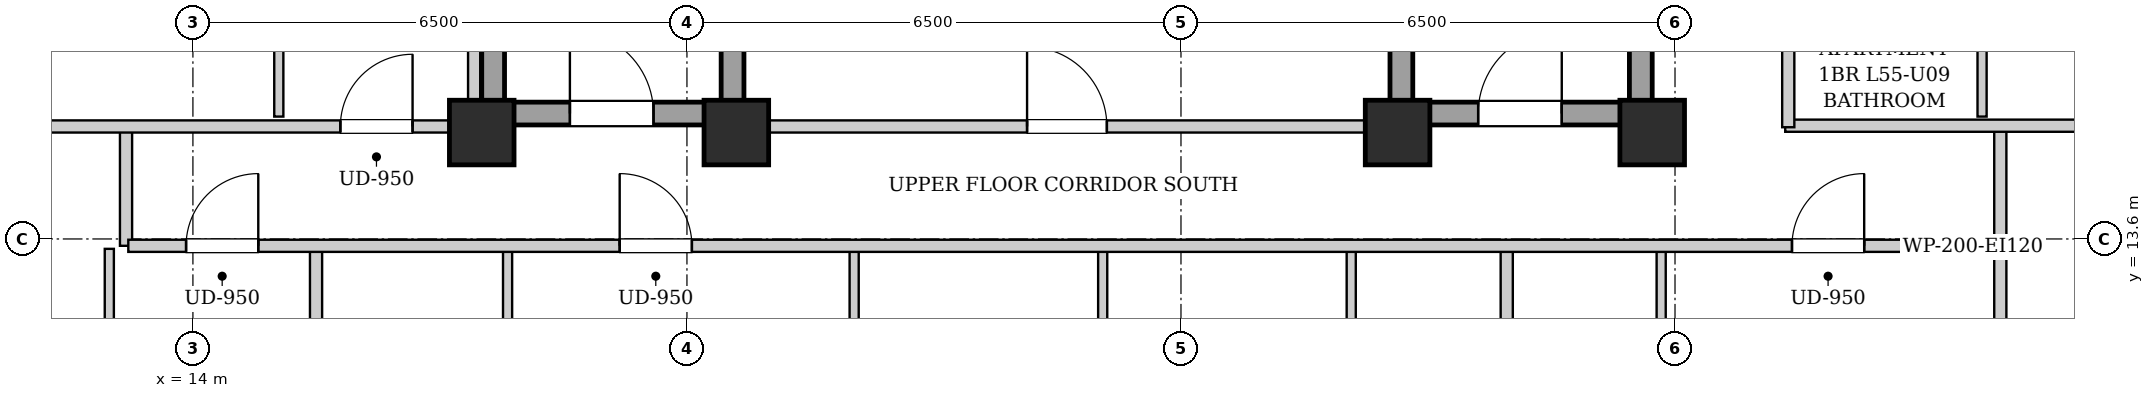
"""IFC4 building model, lengths in metres.
Left out: names, types, materials, properties, quantities, classifications, styles, units other than length and angle.
Written with IfcOpenShell. Run it as: python <this file> out.ifc"""

import sys

from ifc_helpers import new_model, si_unit, direction, frame, frame_2d, origin, origin_2d, place, context, subcontext, project, spatial, rectangle, extrude, element, fill, save


model = new_model("IFC4")
c1 = context("Model", 3, precision=1e-05, world=origin(), true_north=direction((0.0, 1.0)))
c2 = subcontext(c1, "Body", "Model", "MODEL_VIEW")
j1 = project(units=[si_unit("LENGTHUNIT", "METRE"), si_unit("PLANEANGLEUNIT", "RADIAN")], contexts=[c1])
p1 = place(None, origin())
s1 = spatial("IfcSite", under=j1, at=p1, CompositionType="ELEMENT")
p2 = place(p1, origin())
s2 = spatial("IfcBuilding", under=s1, at=p2, CompositionType="ELEMENT")
p3 = place(p2, frame((0.0, 0.0, 190.9)))
s3 = spatial("IfcBuildingStorey", under=s2, at=p3, CompositionType="ELEMENT", Elevation=190.9)
for number, where, z_axis, x_axis in (
    (1, (17.8, 15.0, 0.0), (0.0, 0.0, 1.0), (1.0, 0.0, 0.0)),
    (2, (21.15, 15.0, 0.0), (0.0, 0.0, 1.0), (1.0, 0.0, 0.0)),
    (3, (29.85, 15.0, 0.0), (0.0, 0.0, 1.0), (1.0, 0.0, 0.0)),
    (4, (33.2, 15.0, 0.0), (0.0, 0.0, 1.0), (1.0, 0.0, 0.0)),
):
    element("IfcColumn", number, at=place(p3, frame(where, z_axis=z_axis, x_axis=x_axis)), inside=s3, PredefinedType="COLUMN", context=c2, shape_type="SweptSolid", body=[
        extrude(rectangle(XDim=0.85, YDim=0.85, at=origin_2d()), origin(), (0.0, 0.0, 1.0), 3.3),
    ])
for number, where, z_axis, x_axis in (
    (5, (17.95, 15.1, 0.0), (0.0, 0.0, 1.0), (0.0, 1.0, 0.0)),
    (6, (21.1, 15.1, 0.0), (0.0, 0.0, 1.0), (0.0, 1.0, 0.0)),
):
    element("IfcWall", number, at=place(p3, frame(where, z_axis=z_axis, x_axis=x_axis)), inside=s3, PredefinedType="SHEAR", context=c2, shape_type="SweptSolid", body=[
        extrude(rectangle(XDim=9.0, YDim=0.3, at=frame_2d((4.5, 0.0))), origin(), (0.0, 0.0, 1.0), 3.04),
    ])
p4 = place(p3, frame((18.1, 15.25, 0.0), z_axis=(0.0, 0.0, 1.0), x_axis=(1.0, 0.0, 0.0)))
e7 = element("IfcWall", 7, at=p4, inside=s3, PredefinedType="SHEAR", context=c2, shape_type="SweptSolid", body=[
    extrude(rectangle(XDim=2.85, YDim=0.3, at=frame_2d((1.425, 0.0))), origin(), (0.0, 0.0, 1.0), 3.04),
])
p5 = place(p4, frame((0.86, 0.0, 0.0)))
e8 = element("IfcOpeningElement", 8, at=p5, cuts=e7, PredefinedType="OPENING", context=c2, shape_type="SweptSolid", body=[
    extrude(rectangle(XDim=1.1, YDim=2.05, at=frame_2d((0.55, 1.025))), frame((0.0, 0.16, 0.0), z_axis=(0.0, -1.0, 0.0), x_axis=(1.0, 0.0, 0.0)), (0.0, 0.0, 1.0), 0.32),
])
for number, where, z_axis, x_axis in (
    (9, (29.9, 15.1, 0.0), (0.0, 0.0, 1.0), (0.0, 1.0, 0.0)),
    (10, (33.05, 15.1, 0.0), (0.0, 0.0, 1.0), (0.0, 1.0, 0.0)),
):
    element("IfcWall", number, at=place(p3, frame(where, z_axis=z_axis, x_axis=x_axis)), inside=s3, PredefinedType="SHEAR", context=c2, shape_type="SweptSolid", body=[
        extrude(rectangle(XDim=9.0, YDim=0.3, at=frame_2d((4.5, 0.0))), origin(), (0.0, 0.0, 1.0), 3.04),
    ])
p6 = place(p3, frame((30.05, 15.25, 0.0), z_axis=(0.0, 0.0, 1.0), x_axis=(1.0, 0.0, 0.0)))
e11 = element("IfcWall", 11, at=p6, inside=s3, PredefinedType="SHEAR", context=c2, shape_type="SweptSolid", body=[
    extrude(rectangle(XDim=2.85, YDim=0.3, at=frame_2d((1.425, 0.0))), origin(), (0.0, 0.0, 1.0), 3.04),
])
p7 = place(p6, frame((0.86, 0.0, 0.0)))
e12 = element("IfcOpeningElement", 12, at=p7, cuts=e11, PredefinedType="OPENING", context=c2, shape_type="SweptSolid", body=[
    extrude(rectangle(XDim=1.1, YDim=2.05, at=frame_2d((0.55, 1.025))), frame((0.0, 0.16, 0.0), z_axis=(0.0, -1.0, 0.0), x_axis=(1.0, 0.0, 0.0)), (0.0, 0.0, 1.0), 0.32),
])
p8 = place(p3, frame((21.25, 15.08, 0.0), z_axis=(0.0, 0.0, 1.0), x_axis=(1.0, 0.0, 0.0)))
e13 = element("IfcWall", 13, at=p8, inside=s3, PredefinedType="PARTITIONING", context=c2, shape_type="SweptSolid", body=[
    extrude(rectangle(XDim=8.5, YDim=0.16, at=frame_2d((4.25, 0.0))), origin(), (0.0, 0.0, 1.0), 2.556),
])
p9 = place(p8, frame((3.725, 0.0, 0.0)))
e14 = element("IfcOpeningElement", 14, at=p9, cuts=e13, PredefinedType="OPENING", context=c2, shape_type="SweptSolid", body=[
    extrude(rectangle(XDim=1.05, YDim=2.05, at=frame_2d((0.525, 1.025))), frame((0.0, 0.09, 0.0), z_axis=(0.0, -1.0, 0.0), x_axis=(1.0, 0.0, 0.0)), (0.0, 0.0, 1.0), 0.18),
])
for number, where, z_axis, x_axis in (
    (15, (13.12, 13.51, 0.0), (0.0, 0.0, 1.0), (0.0, 1.0, 0.0)),
    (16, (37.78, 13.51, 0.0), (0.0, 0.0, 1.0), (0.0, 1.0, 0.0)),
):
    element("IfcWall", number, at=place(p3, frame(where, z_axis=z_axis, x_axis=x_axis)), inside=s3, PredefinedType="PARTITIONING", context=c2, shape_type="SweptSolid", body=[
        extrude(rectangle(XDim=1.58, YDim=0.16, at=frame_2d((0.79, 0.0))), origin(), (0.0, 0.0, 1.0), 3.04),
    ])
p10 = place(p3, frame((34.95, 15.09, 0.0), z_axis=(0.0, 0.0, 1.0), x_axis=(1.0, 0.0, 0.0)))
e17 = element("IfcWall", 17, at=p10, inside=s3, PredefinedType="PARTITIONING", context=c2, shape_type="SweptSolid", body=[
    extrude(rectangle(XDim=5.07, YDim=0.16, at=frame_2d((2.535, 0.0))), origin(), (0.0, 0.0, 1.0), 2.556),
])
p11 = place(p3, frame((12.9, 10.62, 0.0), z_axis=(0.0, 0.0, 1.0), x_axis=(0.0, 1.0, 0.0)))
e18 = element("IfcWall", 18, at=p11, inside=s3, PredefinedType="PARTITIONING", context=c2, shape_type="SweptSolid", body=[
    extrude(rectangle(XDim=2.85, YDim=0.12, at=frame_2d((1.425, 0.0))), origin(), (0.0, 0.0, 1.0), 3.04),
])
p12 = place(p11, frame((0.995, 0.0, 0.0)))
e19 = element("IfcOpeningElement", 19, at=p12, cuts=e18, PredefinedType="OPENING", context=c2, shape_type="SweptSolid", body=[
    extrude(rectangle(XDim=0.86, YDim=2.05, at=frame_2d((0.43, 1.025))), frame((0.0, 0.07, 0.0), z_axis=(0.0, -1.0, 0.0), x_axis=(1.0, 0.0, 0.0)), (0.0, 0.0, 1.0), 0.14),
])
p13 = place(p3, frame((15.62, 4.08, 0.0), z_axis=(0.0, 0.0, 1.0), x_axis=(0.0, 1.0, 0.0)))
e20 = element("IfcWall", 20, at=p13, inside=s3, PredefinedType="PARTITIONING", context=c2, shape_type="SweptSolid", body=[
    extrude(rectangle(XDim=9.39, YDim=0.16, at=frame_2d((4.695, 0.0))), origin(), (0.0, 0.0, 1.0), 3.04),
])
p14 = place(p3, frame((18.14, 10.62, 0.0), z_axis=(0.0, 0.0, 1.0), x_axis=(0.0, 1.0, 0.0)))
e21 = element("IfcWall", 21, at=p14, inside=s3, PredefinedType="PARTITIONING", context=c2, shape_type="SweptSolid", body=[
    extrude(rectangle(XDim=2.85, YDim=0.12, at=frame_2d((1.425, 0.0))), origin(), (0.0, 0.0, 1.0), 3.04),
])
p15 = place(p14, frame((0.995, 0.0, 0.0)))
e22 = element("IfcOpeningElement", 22, at=p15, cuts=e21, PredefinedType="OPENING", context=c2, shape_type="SweptSolid", body=[
    extrude(rectangle(XDim=0.86, YDim=2.05, at=frame_2d((0.43, 1.025))), frame((0.0, 0.07, 0.0), z_axis=(0.0, -1.0, 0.0), x_axis=(1.0, 0.0, 0.0)), (0.0, 0.0, 1.0), 0.14),
])
p16 = place(p3, frame((22.7, 10.62, 0.0), z_axis=(0.0, 0.0, 1.0), x_axis=(0.0, 1.0, 0.0)))
e23 = element("IfcWall", 23, at=p16, inside=s3, PredefinedType="PARTITIONING", context=c2, shape_type="SweptSolid", body=[
    extrude(rectangle(XDim=2.85, YDim=0.12, at=frame_2d((1.425, 0.0))), origin(), (0.0, 0.0, 1.0), 3.04),
])
p17 = place(p16, frame((0.975, 0.0, 0.0)))
e24 = element("IfcOpeningElement", 24, at=p17, cuts=e23, PredefinedType="OPENING", context=c2, shape_type="SweptSolid", body=[
    extrude(rectangle(XDim=0.9, YDim=2.05, at=frame_2d((0.45, 1.025))), frame((0.0, 0.07, 0.0), z_axis=(0.0, -1.0, 0.0), x_axis=(1.0, 0.0, 0.0)), (0.0, 0.0, 1.0), 0.14),
])
p18 = place(p3, frame((25.97, 10.62, 0.0), z_axis=(0.0, 0.0, 1.0), x_axis=(0.0, 1.0, 0.0)))
e25 = element("IfcWall", 25, at=p18, inside=s3, PredefinedType="PARTITIONING", context=c2, shape_type="SweptSolid", body=[
    extrude(rectangle(XDim=2.85, YDim=0.12, at=frame_2d((1.425, 0.0))), origin(), (0.0, 0.0, 1.0), 3.04),
])
p19 = place(p18, frame((0.975, 0.0, 0.0)))
e26 = element("IfcOpeningElement", 26, at=p19, cuts=e25, PredefinedType="OPENING", context=c2, shape_type="SweptSolid", body=[
    extrude(rectangle(XDim=0.9, YDim=2.05, at=frame_2d((0.45, 1.025))), frame((0.0, 0.07, 0.0), z_axis=(0.0, -1.0, 0.0), x_axis=(1.0, 0.0, 0.0)), (0.0, 0.0, 1.0), 0.14),
])
p20 = place(p3, frame((29.24, 10.62, 0.0), z_axis=(0.0, 0.0, 1.0), x_axis=(0.0, 1.0, 0.0)))
e27 = element("IfcWall", 27, at=p20, inside=s3, PredefinedType="PARTITIONING", context=c2, shape_type="SweptSolid", body=[
    extrude(rectangle(XDim=2.85, YDim=0.12, at=frame_2d((1.425, 0.0))), origin(), (0.0, 0.0, 1.0), 3.04),
])
p21 = place(p20, frame((0.975, 0.0, 0.0)))
e28 = element("IfcOpeningElement", 28, at=p21, cuts=e27, PredefinedType="OPENING", context=c2, shape_type="SweptSolid", body=[
    extrude(rectangle(XDim=0.9, YDim=2.05, at=frame_2d((0.45, 1.025))), frame((0.0, 0.07, 0.0), z_axis=(0.0, -1.0, 0.0), x_axis=(1.0, 0.0, 0.0)), (0.0, 0.0, 1.0), 0.14),
])
p22 = place(p3, frame((37.78, 10.56, 0.0), z_axis=(0.0, 0.0, 1.0), x_axis=(0.0, 1.0, 0.0)))
e29 = element("IfcWall", 29, at=p22, inside=s3, PredefinedType="PARTITIONING", context=c2, shape_type="SweptSolid", body=[
    extrude(rectangle(XDim=2.91, YDim=0.16, at=frame_2d((1.455, 0.0))), origin(), (0.0, 0.0, 1.0), 3.04),
])
p23 = place(p3, frame((31.286, 4.08, 0.0), z_axis=(0.0, 0.0, 1.0), x_axis=(0.0, 1.0, 0.0)))
e30 = element("IfcWall", 30, at=p23, inside=s3, PredefinedType="PARTITIONING", context=c2, shape_type="SweptSolid", body=[
    extrude(rectangle(XDim=9.39, YDim=0.16, at=frame_2d((4.695, 0.0))), origin(), (0.0, 0.0, 1.0), 3.04),
])
p24 = place(p3, frame((33.318, 10.62, 0.0), z_axis=(0.0, 0.0, 1.0), x_axis=(0.0, 1.0, 0.0)))
e31 = element("IfcWall", 31, at=p24, inside=s3, PredefinedType="PARTITIONING", context=c2, shape_type="SweptSolid", body=[
    extrude(rectangle(XDim=2.85, YDim=0.12, at=frame_2d((1.425, 0.0))), origin(), (0.0, 0.0, 1.0), 3.04),
])
p25 = place(p24, frame((0.995, 0.0, 0.0)))
e32 = element("IfcOpeningElement", 32, at=p25, cuts=e31, PredefinedType="OPENING", context=c2, shape_type="SweptSolid", body=[
    extrude(rectangle(XDim=0.86, YDim=2.05, at=frame_2d((0.43, 1.025))), frame((0.0, 0.07, 0.0), z_axis=(0.0, -1.0, 0.0), x_axis=(1.0, 0.0, 0.0)), (0.0, 0.0, 1.0), 0.14),
])
p26 = place(p3, frame((10.88, 15.08, 0.0), z_axis=(0.0, 0.0, 1.0), x_axis=(1.0, 0.0, 0.0)))
e33 = element("IfcWall", 33, at=p26, inside=s3, PredefinedType="PARTITIONING", context=c2, shape_type="SweptSolid", body=[
    extrude(rectangle(XDim=6.88, YDim=0.16, at=frame_2d((3.44, 0.0))), origin(), (0.0, 0.0, 1.0), 2.556),
])
p27 = place(p26, frame((5.06, 0.0, 0.0)))
e34 = element("IfcOpeningElement", 34, at=p27, cuts=e33, PredefinedType="OPENING", context=c2, shape_type="SweptSolid", body=[
    extrude(rectangle(XDim=0.95, YDim=2.1, at=frame_2d((0.475, 1.05))), frame((0.0, 0.09, 0.0), z_axis=(0.0, -1.0, 0.0), x_axis=(1.0, 0.0, 0.0)), (0.0, 0.0, 1.0), 0.18),
])
p28 = place(p3, frame((15.13, 15.21, 0.0), z_axis=(0.0, 0.0, 1.0), x_axis=(0.0, 1.0, 0.0)))
e35 = element("IfcWall", 35, at=p28, inside=s3, PredefinedType="PARTITIONING", context=c2, shape_type="SweptSolid", body=[
    extrude(rectangle(XDim=4.5, YDim=0.12, at=frame_2d((2.25, 0.0))), origin(), (0.0, 0.0, 1.0), 3.04),
])
p29 = place(p28, frame((1.8, 0.0, 0.0)))
e36 = element("IfcOpeningElement", 36, at=p29, cuts=e35, PredefinedType="OPENING", context=c2, shape_type="SweptSolid", body=[
    extrude(rectangle(XDim=0.9, YDim=2.05, at=frame_2d((0.45, 1.025))), frame((0.0, 0.07, 0.0), z_axis=(0.0, -1.0, 0.0), x_axis=(1.0, 0.0, 0.0)), (0.0, 0.0, 1.0), 0.14),
])
p30 = place(p3, frame((37.54, 15.21, 0.0), z_axis=(0.0, 0.0, 1.0), x_axis=(0.0, 1.0, 0.0)))
e37 = element("IfcWall", 37, at=p30, inside=s3, PredefinedType="PARTITIONING", context=c2, shape_type="SweptSolid", body=[
    extrude(rectangle(XDim=2.159, YDim=0.12, at=frame_2d((1.08, 0.0))), origin(), (0.0, 0.0, 1.0), 3.04),
])
p31 = place(p3, frame((13.15, 13.51, 0.0), z_axis=(0.0, 0.0, 1.0), x_axis=(1.0, 0.0, 0.0)))
e38 = element("IfcWall", 38, at=p31, inside=s3, PredefinedType="PARTITIONING", context=c2, shape_type="SweptSolid", body=[
    extrude(rectangle(XDim=24.6, YDim=0.16, at=frame_2d((12.3, 0.0))), origin(), (0.0, 0.0, 1.0), 3.04),
])
p32 = place(p31, frame((0.76, 0.0, 0.0)))
e39 = element("IfcOpeningElement", 39, at=p32, cuts=e38, PredefinedType="OPENING", context=c2, shape_type="SweptSolid", body=[
    extrude(rectangle(XDim=0.95, YDim=2.1, at=frame_2d((0.475, 1.05))), frame((0.0, 0.09, 0.0), z_axis=(0.0, -1.0, 0.0), x_axis=(1.0, 0.0, 0.0)), (0.0, 0.0, 1.0), 0.18),
])
p33 = place(p31, frame((6.465, 0.0, 0.0)))
e40 = element("IfcOpeningElement", 40, at=p33, cuts=e38, PredefinedType="OPENING", context=c2, shape_type="SweptSolid", body=[
    extrude(rectangle(XDim=0.95, YDim=2.1, at=frame_2d((0.475, 1.05))), frame((0.0, 0.09, 0.0), z_axis=(0.0, -1.0, 0.0), x_axis=(1.0, 0.0, 0.0)), (0.0, 0.0, 1.0), 0.18),
])
p34 = place(p31, frame((21.889, 0.0, 0.0)))
e41 = element("IfcOpeningElement", 41, at=p34, cuts=e38, PredefinedType="OPENING", context=c2, shape_type="SweptSolid", body=[
    extrude(rectangle(XDim=0.95, YDim=2.1, at=frame_2d((0.475, 1.05))), frame((0.0, 0.09, 0.0), z_axis=(0.0, -1.0, 0.0), x_axis=(1.0, 0.0, 0.0)), (0.0, 0.0, 1.0), 0.18),
])
p35 = place(p3, frame((17.7, 15.02, 0.0), z_axis=(0.0, 0.0, 1.0), x_axis=(0.0, 1.0, 0.0)))
e42 = element("IfcWall", 42, at=p35, inside=s3, PredefinedType="PARTITIONING", context=c2, shape_type="SweptSolid", body=[
    extrude(rectangle(XDim=13.98, YDim=0.16, at=frame_2d((6.99, 0.0))), origin(), (0.0, 0.0, 1.0), 3.04),
])
p36 = place(p3, frame((34.99, 15.07, 0.0), z_axis=(0.0, 0.0, 1.0), x_axis=(0.0, 1.0, 0.0)))
e43 = element("IfcWall", 43, at=p36, inside=s3, PredefinedType="PARTITIONING", context=c2, shape_type="SweptSolid", body=[
    extrude(rectangle(XDim=13.93, YDim=0.16, at=frame_2d((6.965, 0.0))), origin(), (0.0, 0.0, 1.0), 3.04),
])
p37 = place(p36, frame((4.661, 0.0, 0.0)))
e44 = element("IfcOpeningElement", 44, at=p37, cuts=e43, PredefinedType="OPENING", context=c2, shape_type="SweptSolid", body=[
    extrude(rectangle(XDim=0.95, YDim=2.1, at=frame_2d((0.475, 1.05))), frame((0.0, 0.09, 0.0), z_axis=(0.0, -1.0, 0.0), x_axis=(1.0, 0.0, 0.0)), (0.0, 0.0, 1.0), 0.18),
])
p38 = place(p36, frame((11.411, 0.0, 0.0)))
e45 = element("IfcOpeningElement", 45, at=p38, cuts=e43, PredefinedType="OPENING", context=c2, shape_type="SweptSolid", body=[
    extrude(rectangle(XDim=0.95, YDim=2.1, at=frame_2d((0.475, 1.05))), frame((0.0, 0.09, 0.0), z_axis=(0.0, -1.0, 0.0), x_axis=(1.0, 0.0, 0.0)), (0.0, 0.0, 1.0), 0.18),
])
p39 = place(p5, origin())
e46 = element("IfcDoor", 46, at=p39, inside=s3, OperationType="SINGLE_SWING_LEFT", PredefinedType="DOOR", context=c2, shape_type="SweptSolid", body=[
    extrude(rectangle(XDim=1.1, YDim=2.05, at=frame_2d((0.55, 1.025))), frame((0.0, 0.025, 0.0), z_axis=(0.0, -1.0, 0.0), x_axis=(1.0, 0.0, 0.0)), (0.0, 0.0, 1.0), 0.05),
])
fill(e8, e46)
p40 = place(p7, origin())
e47 = element("IfcDoor", 47, at=p40, inside=s3, OperationType="SINGLE_SWING_RIGHT", PredefinedType="DOOR", context=c2, shape_type="SweptSolid", body=[
    extrude(rectangle(XDim=1.1, YDim=2.05, at=frame_2d((0.55, 1.025))), frame((0.0, 0.025, 0.0), z_axis=(0.0, -1.0, 0.0), x_axis=(1.0, 0.0, 0.0)), (0.0, 0.0, 1.0), 0.05),
])
fill(e12, e47)
p41 = place(p9, origin())
e48 = element("IfcDoor", 48, at=p41, inside=s3, OperationType="SINGLE_SWING_LEFT", PredefinedType="DOOR", context=c2, shape_type="SweptSolid", body=[
    extrude(rectangle(XDim=1.05, YDim=2.05, at=frame_2d((0.525, 1.025))), frame((0.0, 0.025, 0.0), z_axis=(0.0, -1.0, 0.0), x_axis=(1.0, 0.0, 0.0)), (0.0, 0.0, 1.0), 0.05),
])
fill(e14, e48)
p42 = place(p27, origin())
e49 = element("IfcDoor", 49, at=p42, inside=s3, OperationType="SINGLE_SWING_RIGHT", PredefinedType="DOOR", context=c2, shape_type="SweptSolid", body=[
    extrude(rectangle(XDim=0.95, YDim=2.1, at=frame_2d((0.475, 1.05))), frame((0.0, 0.025, 0.0), z_axis=(0.0, -1.0, 0.0), x_axis=(1.0, 0.0, 0.0)), (0.0, 0.0, 1.0), 0.05),
])
fill(e34, e49)
p43 = place(p32, origin())
e50 = element("IfcDoor", 50, at=p43, inside=s3, OperationType="SINGLE_SWING_RIGHT", PredefinedType="DOOR", context=c2, shape_type="SweptSolid", body=[
    extrude(rectangle(XDim=0.95, YDim=2.1, at=frame_2d((0.475, 1.05))), frame((0.0, 0.025, 0.0), z_axis=(0.0, -1.0, 0.0), x_axis=(1.0, 0.0, 0.0)), (0.0, 0.0, 1.0), 0.05),
])
fill(e39, e50)
p44 = place(p33, origin())
e51 = element("IfcDoor", 51, at=p44, inside=s3, OperationType="SINGLE_SWING_LEFT", PredefinedType="DOOR", context=c2, shape_type="SweptSolid", body=[
    extrude(rectangle(XDim=0.95, YDim=2.1, at=frame_2d((0.475, 1.05))), frame((0.0, 0.025, 0.0), z_axis=(0.0, -1.0, 0.0), x_axis=(1.0, 0.0, 0.0)), (0.0, 0.0, 1.0), 0.05),
])
fill(e40, e51)
p45 = place(p34, origin())
e52 = element("IfcDoor", 52, at=p45, inside=s3, OperationType="SINGLE_SWING_RIGHT", PredefinedType="DOOR", context=c2, shape_type="SweptSolid", body=[
    extrude(rectangle(XDim=0.95, YDim=2.1, at=frame_2d((0.475, 1.05))), frame((0.0, 0.025, 0.0), z_axis=(0.0, -1.0, 0.0), x_axis=(1.0, 0.0, 0.0)), (0.0, 0.0, 1.0), 0.05),
])
fill(e41, e52)
save(model, sys.argv[1])
